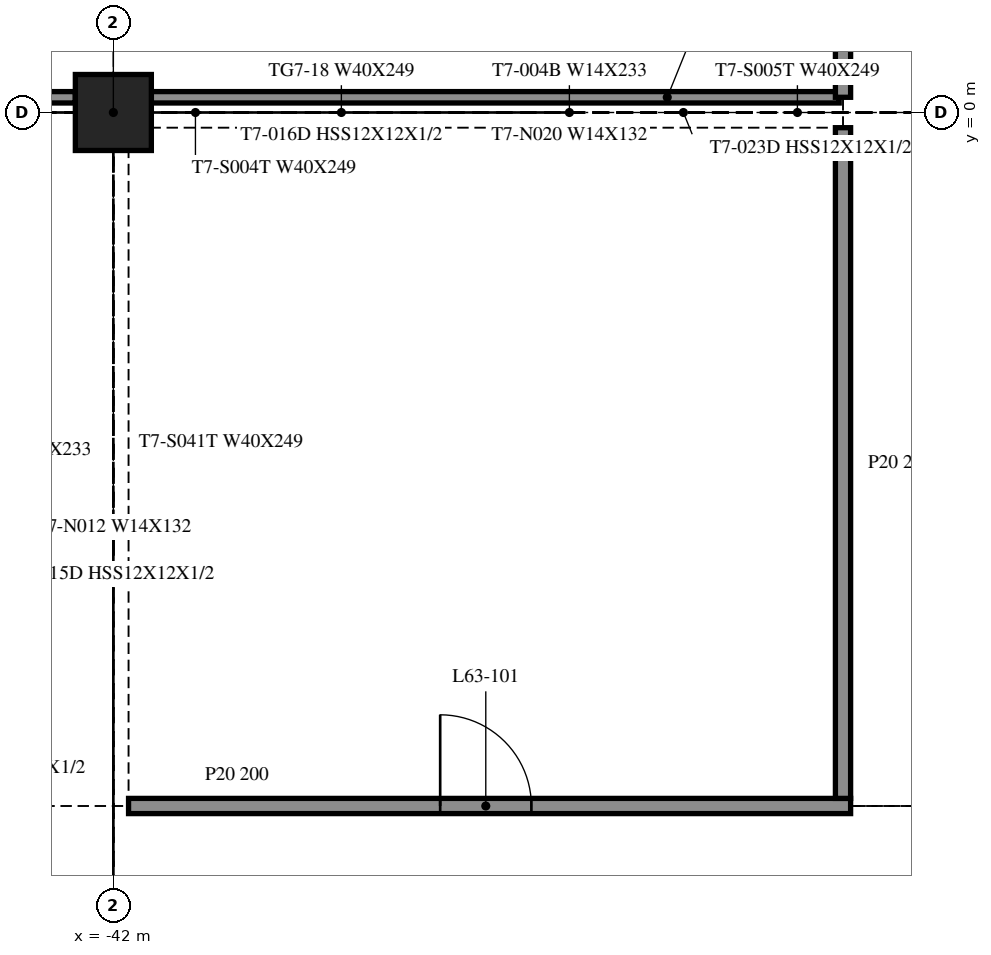
"""IFC4 building model, lengths in metres.
Left out: names, types, materials, properties, quantities, classifications, styles, units other than length and angle.
Written with IfcOpenShell. Run it as: python <this file> out.ifc"""

import sys

from ifc_helpers import new_model, si_unit, direction, frame, frame_2d, origin, origin_2d, place, context, subcontext, project, spatial, rectangle, extrude, element, fill, save


model = new_model("IFC4")
c1 = context("Model", 3, precision=1e-05, world=origin(), true_north=direction((0.0, 1.0)))
c2 = subcontext(c1, "Body", "Model", "MODEL_VIEW")
j1 = project(units=[si_unit("LENGTHUNIT", "METRE"), si_unit("PLANEANGLEUNIT", "RADIAN")], contexts=[c1])
p1 = place(None, origin())
s1 = spatial("IfcSite", under=j1, at=p1, CompositionType="ELEMENT")
p2 = place(p1, origin())
s2 = spatial("IfcBuilding", under=s1, at=p2, CompositionType="ELEMENT")
p3 = place(p2, frame((0.0, 0.0, 259.0)))
s3 = spatial("IfcBuildingStorey", under=s2, at=p3, CompositionType="ELEMENT", Elevation=259.0)
p4 = place(p3, frame((-42.0, 0.0, -0.4), z_axis=(0.0, 0.0, 1.0), x_axis=(1.0, 0.0, 0.0)))
e1 = element("IfcColumn", 1, at=p4, inside=s3, PredefinedType="COLUMN", context=c2, shape_type="SweptSolid", body=[
    extrude(rectangle(XDim=1.0, YDim=1.0, at=origin_2d()), origin(), (0.0, 0.0, 1.0), 4.36),
])
p5 = place(p3, frame((-41.8, -9.125, 0.0), z_axis=(0.0, 0.0, 1.0), x_axis=(1.0, 0.0, 0.0)))
e2 = element("IfcWall", 2, at=p5, inside=s3, PredefinedType="PARTITIONING", context=c2, shape_type="SweptSolid", body=[
    extrude(rectangle(XDim=9.5, YDim=0.2, at=frame_2d((4.75, 0.0))), origin(), (0.0, 0.0, 1.0), 3.96),
])
p6 = place(p5, frame((4.1, 0.0, 0.0)))
e3 = element("IfcOpeningElement", 3, at=p6, cuts=e2, PredefinedType="OPENING", context=c2, shape_type="SweptSolid", body=[
    extrude(rectangle(XDim=1.2, YDim=2.1, at=frame_2d((0.6, 1.05))), frame((0.0, 0.11, 0.0), z_axis=(0.0, -1.0, 0.0), x_axis=(1.0, 0.0, 0.0)), (0.0, 0.0, 1.0), 0.22),
])
p7 = place(p3, frame((-48.0, 0.2, 0.0), z_axis=(0.0, 0.0, 1.0), x_axis=(1.0, 0.0, 0.0)))
e4 = element("IfcWall", 4, at=p7, inside=s3, PredefinedType="PARTITIONING", context=c2, shape_type="SweptSolid", body=[
    extrude(rectangle(XDim=5.5, YDim=0.15, at=frame_2d((2.75, 0.0))), origin(), (0.0, 0.0, 1.0), 3.96),
])
p8 = place(p3, frame((-41.5, 0.2, 0.0), z_axis=(0.0, 0.0, 1.0), x_axis=(1.0, 0.0, 0.0)))
e5 = element("IfcWall", 5, at=p8, inside=s3, PredefinedType="PARTITIONING", context=c2, shape_type="SweptSolid", body=[
    extrude(rectangle(XDim=9.05, YDim=0.15, at=frame_2d((4.525, 0.0))), origin(), (0.0, 0.0, 1.0), 3.96),
])
p9 = place(p3, frame((-32.4, -9.025, 0.0), z_axis=(0.0, 0.0, 1.0), x_axis=(0.0, 1.0, 0.0)))
e6 = element("IfcWall", 6, at=p9, inside=s3, PredefinedType="PARTITIONING", context=c2, shape_type="SweptSolid", body=[
    extrude(rectangle(XDim=8.825, YDim=0.2, at=frame_2d((4.413, 0.0))), origin(), (0.0, 0.0, 1.0), 3.96),
])
p10 = place(p3, frame((-32.4, 0.2, 0.0), z_axis=(0.0, 0.0, 1.0), x_axis=(0.0, 1.0, 0.0)))
e7 = element("IfcWall", 7, at=p10, inside=s3, PredefinedType="PARTITIONING", context=c2, shape_type="SweptSolid", body=[
    extrude(rectangle(XDim=11.1, YDim=0.2, at=frame_2d((5.55, 0.0))), origin(), (0.0, 0.0, 1.0), 3.96),
])
p11 = place(p10, frame((4.9, 0.0, 0.0)))
e8 = element("IfcOpeningElement", 8, at=p11, cuts=e7, PredefinedType="OPENING", context=c2, shape_type="SweptSolid", body=[
    extrude(rectangle(XDim=1.2, YDim=2.1, at=frame_2d((0.6, 1.05))), frame((0.0, 0.11, 0.0), z_axis=(0.0, -1.0, 0.0), x_axis=(1.0, 0.0, 0.0)), (0.0, 0.0, 1.0), 0.22),
])
p12 = place(p6, origin())
e9 = element("IfcDoor", 9, at=p12, inside=s3, OperationType="SINGLE_SWING_LEFT", PredefinedType="DOOR", context=c2, shape_type="SweptSolid", body=[
    extrude(rectangle(XDim=1.2, YDim=2.1, at=frame_2d((0.6, 1.05))), frame((0.0, 0.025, 0.0), z_axis=(0.0, -1.0, 0.0), x_axis=(1.0, 0.0, 0.0)), (0.0, 0.0, 1.0), 0.05),
])
fill(e3, e9)
save(model, sys.argv[1])
